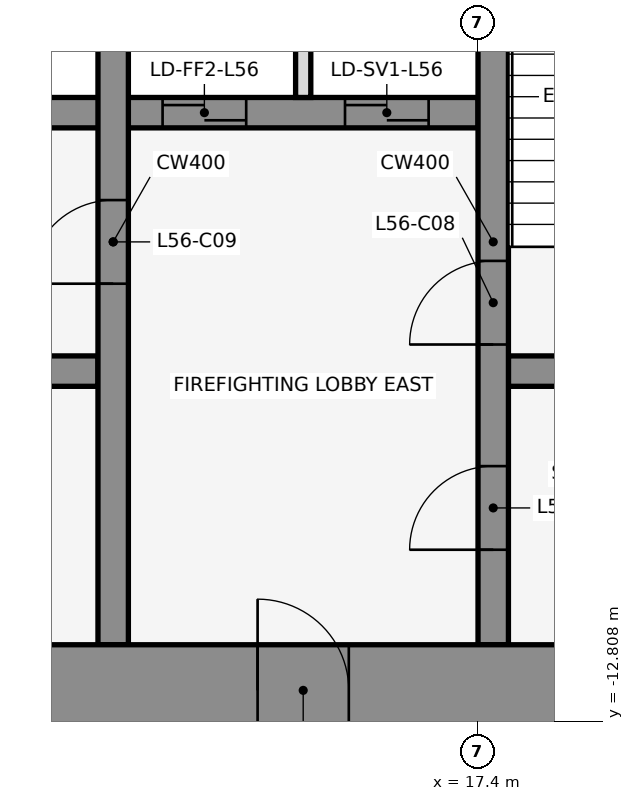
"""IFC4 building model, lengths in metres.
Left out: names, types, materials, properties, quantities, classifications, styles, units other than length and angle.
Written with IfcOpenShell. Run it as: python <this file> out.ifc"""

import sys

from ifc_helpers import new_model, si_unit, direction, frame, frame_2d, origin, place, context, subcontext, project, spatial, rectangle, extrude, element, fill, save


model = new_model("IFC4")
c1 = context("Model", 3, precision=1e-05, world=origin(), true_north=direction((0.0, 1.0)))
c2 = subcontext(c1, "Body", "Model", "MODEL_VIEW")
j1 = project(units=[si_unit("LENGTHUNIT", "METRE"), si_unit("PLANEANGLEUNIT", "RADIAN")], contexts=[c1])
p1 = place(None, origin())
s1 = spatial("IfcSite", under=j1, at=p1, CompositionType="ELEMENT")
p2 = place(p1, origin())
s2 = spatial("IfcBuilding", under=s1, at=p2, CompositionType="ELEMENT")
p3 = place(p2, frame((0.0, 0.0, 249.8)))
s3 = spatial("IfcBuildingStorey", under=s2, at=p3, CompositionType="ELEMENT", Elevation=249.8)
p4 = place(p3, frame((6.4, -8.2, 0.0), z_axis=(0.0, 0.0, 1.0), x_axis=(1.0, 0.0, 0.0)))
e1 = element("IfcWall", 1, at=p4, inside=s3, PredefinedType="SHEAR", context=c2, shape_type="SweptSolid", body=[
    extrude(rectangle(XDim=6.0, YDim=0.4, at=frame_2d((3.0, 0.0))), origin(), (0.0, 0.0, 1.0), 4.2),
])
p5 = place(p4, frame((2.65, 0.0, 0.0)))
e2 = element("IfcOpeningElement", 2, at=p5, cuts=e1, PredefinedType="OPENING", context=c2, shape_type="SweptSolid", body=[
    extrude(rectangle(XDim=0.9, YDim=2.1, at=frame_2d((0.45, 1.05))), frame((0.0, 0.212, 0.0), z_axis=(0.0, -1.0, 0.0), x_axis=(1.0, 0.0, 0.0)), (0.0, 0.0, 1.0), 0.424),
])
p6 = place(p3, frame((17.8, -8.2, 0.0), z_axis=(0.0, 0.0, 1.0), x_axis=(1.0, 0.0, 0.0)))
e3 = element("IfcWall", 3, at=p6, inside=s3, PredefinedType="SHEAR", context=c2, shape_type="SweptSolid", body=[
    extrude(rectangle(XDim=3.0, YDim=0.4, at=frame_2d((1.5, 0.0))), origin(), (0.0, 0.0, 1.0), 4.2),
])
p7 = place(p6, frame((0.85, 0.0, 0.0)))
e4 = element("IfcOpeningElement", 4, at=p7, cuts=e3, PredefinedType="OPENING", context=c2, shape_type="SweptSolid", body=[
    extrude(rectangle(XDim=1.2, YDim=2.1, at=frame_2d((0.6, 1.05))), frame((0.0, 0.212, 0.0), z_axis=(0.0, -1.0, 0.0), x_axis=(1.0, 0.0, 0.0)), (0.0, 0.0, 1.0), 0.424),
])
p8 = place(p3, frame((3.8, -4.8, 0.0), z_axis=(0.0, 0.0, 1.0), x_axis=(1.0, 0.0, 0.0)))
e5 = element("IfcWall", 5, at=p8, inside=s3, PredefinedType="SHEAR", context=c2, shape_type="SweptSolid", body=[
    extrude(rectangle(XDim=13.6, YDim=0.4, at=frame_2d((6.8, 0.0))), origin(), (0.0, 0.0, 1.0), 4.2),
])
p9 = place(p8, frame((0.75, 0.0, 0.0)))
e6 = element("IfcOpeningElement", 6, at=p9, cuts=e5, PredefinedType="OPENING", context=c2, shape_type="SweptSolid", body=[
    extrude(rectangle(XDim=1.2, YDim=2.1, at=frame_2d((0.6, 1.05))), frame((0.0, 0.212, 0.0), z_axis=(0.0, -1.0, 0.0), x_axis=(1.0, 0.0, 0.0)), (0.0, 0.0, 1.0), 0.424),
])
p10 = place(p8, frame((3.65, 0.0, 0.0)))
e7 = element("IfcOpeningElement", 7, at=p10, cuts=e5, PredefinedType="OPENING", context=c2, shape_type="SweptSolid", body=[
    extrude(rectangle(XDim=1.2, YDim=2.1, at=frame_2d((0.6, 1.05))), frame((0.0, 0.212, 0.0), z_axis=(0.0, -1.0, 0.0), x_axis=(1.0, 0.0, 0.0)), (0.0, 0.0, 1.0), 0.424),
])
p11 = place(p8, frame((6.65, 0.0, 0.0)))
e8 = element("IfcOpeningElement", 8, at=p11, cuts=e5, PredefinedType="OPENING", context=c2, shape_type="SweptSolid", body=[
    extrude(rectangle(XDim=1.2, YDim=2.1, at=frame_2d((0.6, 1.05))), frame((0.0, 0.212, 0.0), z_axis=(0.0, -1.0, 0.0), x_axis=(1.0, 0.0, 0.0)), (0.0, 0.0, 1.0), 0.424),
])
p12 = place(p8, frame((9.45, 0.0, 0.0)))
e9 = element("IfcOpeningElement", 9, at=p12, cuts=e5, PredefinedType="OPENING", context=c2, shape_type="SweptSolid", body=[
    extrude(rectangle(XDim=1.1, YDim=2.1, at=frame_2d((0.55, 1.05))), frame((0.0, 0.212, 0.0), z_axis=(0.0, -1.0, 0.0), x_axis=(1.0, 0.0, 0.0)), (0.0, 0.0, 1.0), 0.424),
])
p13 = place(p8, frame((11.85, 0.0, 0.0)))
e10 = element("IfcOpeningElement", 10, at=p13, cuts=e5, PredefinedType="OPENING", context=c2, shape_type="SweptSolid", body=[
    extrude(rectangle(XDim=1.1, YDim=2.1, at=frame_2d((0.55, 1.05))), frame((0.0, 0.212, 0.0), z_axis=(0.0, -1.0, 0.0), x_axis=(1.0, 0.0, 0.0)), (0.0, 0.0, 1.0), 0.424),
])
p14 = place(p3, frame((12.6, -11.8, 0.0), z_axis=(0.0, 0.0, 1.0), x_axis=(0.0, 1.0, 0.0)))
e11 = element("IfcWall", 11, at=p14, inside=s3, PredefinedType="SHEAR", context=c2, shape_type="SweptSolid", body=[
    extrude(rectangle(XDim=10.6, YDim=0.4, at=frame_2d((5.3, 0.0))), origin(), (0.0, 0.0, 1.0), 4.2),
])
p15 = place(p14, frame((4.75, 0.0, 0.0)))
e12 = element("IfcOpeningElement", 12, at=p15, cuts=e11, PredefinedType="OPENING", context=c2, shape_type="SweptSolid", body=[
    extrude(rectangle(XDim=1.1, YDim=2.1, at=frame_2d((0.55, 1.05))), frame((0.0, 0.212, 0.0), z_axis=(0.0, -1.0, 0.0), x_axis=(1.0, 0.0, 0.0)), (0.0, 0.0, 1.0), 0.424),
])
p16 = place(p3, frame((15.1, -4.6, 0.0), z_axis=(0.0, 0.0, 1.0), x_axis=(0.0, 1.0, 0.0)))
e13 = element("IfcWall", 13, at=p16, inside=s3, PredefinedType="PARTITIONING", context=c2, shape_type="SweptSolid", body=[
    extrude(rectangle(XDim=3.4, YDim=0.2, at=frame_2d((1.7, 0.0))), origin(), (0.0, 0.0, 1.0), 3.039),
])
p17 = place(p3, frame((17.6, -11.8, 0.0), z_axis=(0.0, 0.0, 1.0), x_axis=(0.0, 1.0, 0.0)))
e14 = element("IfcWall", 14, at=p17, inside=s3, PredefinedType="SHEAR", context=c2, shape_type="SweptSolid", body=[
    extrude(rectangle(XDim=10.6, YDim=0.4, at=frame_2d((5.3, 0.0))), origin(), (0.0, 0.0, 1.0), 4.2),
])
p18 = place(p17, frame((1.25, 0.0, 0.0)))
e15 = element("IfcOpeningElement", 15, at=p18, cuts=e14, PredefinedType="OPENING", context=c2, shape_type="SweptSolid", body=[
    extrude(rectangle(XDim=1.1, YDim=2.1, at=frame_2d((0.55, 1.05))), frame((0.0, 0.212, 0.0), z_axis=(0.0, -1.0, 0.0), x_axis=(1.0, 0.0, 0.0)), (0.0, 0.0, 1.0), 0.424),
])
p19 = place(p17, frame((3.95, 0.0, 0.0)))
e16 = element("IfcOpeningElement", 16, at=p19, cuts=e14, PredefinedType="OPENING", context=c2, shape_type="SweptSolid", body=[
    extrude(rectangle(XDim=1.1, YDim=2.1, at=frame_2d((0.55, 1.05))), frame((0.0, 0.212, 0.0), z_axis=(0.0, -1.0, 0.0), x_axis=(1.0, 0.0, 0.0)), (0.0, 0.0, 1.0), 0.424),
])
p20 = place(p3, frame((-22.0, -12.4, 0.0), z_axis=(0.0, 0.0, 1.0), x_axis=(1.0, 0.0, 0.0)))
e17 = element("IfcWall", 17, at=p20, inside=s3, PredefinedType="SHEAR", context=c2, shape_type="SweptSolid", body=[
    extrude(rectangle(XDim=44.0, YDim=1.2, at=frame_2d((22.0, 0.0))), origin(), (0.0, 0.0, 1.0), 4.2),
])
p21 = place(p20, frame((2.2, 0.0, 0.0)))
e18 = element("IfcOpeningElement", 18, at=p21, cuts=e17, PredefinedType="OPENING", context=c2, shape_type="SweptSolid", body=[
    extrude(rectangle(XDim=1.2, YDim=2.1, at=frame_2d((0.6, 1.05))), frame((0.0, 0.612, 0.0), z_axis=(0.0, -1.0, 0.0), x_axis=(1.0, 0.0, 0.0)), (0.0, 0.0, 1.0), 1.224),
])
p22 = place(p20, frame((21.4, 0.0, 0.0)))
e19 = element("IfcOpeningElement", 19, at=p22, cuts=e17, PredefinedType="OPENING", context=c2, shape_type="SweptSolid", body=[
    extrude(rectangle(XDim=1.2, YDim=2.1, at=frame_2d((0.6, 1.05))), frame((0.0, 0.612, 0.0), z_axis=(0.0, -1.0, 0.0), x_axis=(1.0, 0.0, 0.0)), (0.0, 0.0, 1.0), 1.224),
])
p23 = place(p20, frame((40.6, 0.0, 0.0)))
e20 = element("IfcOpeningElement", 20, at=p23, cuts=e17, PredefinedType="OPENING", context=c2, shape_type="SweptSolid", body=[
    extrude(rectangle(XDim=1.2, YDim=2.1, at=frame_2d((0.6, 1.05))), frame((0.0, 0.612, 0.0), z_axis=(0.0, -1.0, 0.0), x_axis=(1.0, 0.0, 0.0)), (0.0, 0.0, 1.0), 1.224),
])
p24 = place(p20, frame((16.0, 0.0, 0.0)))
e21 = element("IfcOpeningElement", 21, at=p24, cuts=e17, PredefinedType="OPENING", context=c2, shape_type="SweptSolid", body=[
    extrude(rectangle(XDim=1.8, YDim=2.1, at=frame_2d((0.9, 1.05))), frame((0.0, 0.612, 0.0), z_axis=(0.0, -1.0, 0.0), x_axis=(1.0, 0.0, 0.0)), (0.0, 0.0, 1.0), 1.224),
])
p25 = place(p20, frame((6.3, 0.0, 0.0)))
e22 = element("IfcOpeningElement", 22, at=p25, cuts=e17, PredefinedType="OPENING", context=c2, shape_type="SweptSolid", body=[
    extrude(rectangle(XDim=1.2, YDim=2.1, at=frame_2d((0.6, 1.05))), frame((0.0, 0.612, 0.0), z_axis=(0.0, -1.0, 0.0), x_axis=(1.0, 0.0, 0.0)), (0.0, 0.0, 1.0), 1.224),
])
p26 = place(p20, frame((26.2, 0.0, 0.0)))
e23 = element("IfcOpeningElement", 23, at=p26, cuts=e17, PredefinedType="OPENING", context=c2, shape_type="SweptSolid", body=[
    extrude(rectangle(XDim=1.8, YDim=2.1, at=frame_2d((0.9, 1.05))), frame((0.0, 0.612, 0.0), z_axis=(0.0, -1.0, 0.0), x_axis=(1.0, 0.0, 0.0)), (0.0, 0.0, 1.0), 1.224),
])
p27 = place(p20, frame((36.5, 0.0, 0.0)))
e24 = element("IfcOpeningElement", 24, at=p27, cuts=e17, PredefinedType="OPENING", context=c2, shape_type="SweptSolid", body=[
    extrude(rectangle(XDim=1.2, YDim=2.1, at=frame_2d((0.6, 1.05))), frame((0.0, 0.612, 0.0), z_axis=(0.0, -1.0, 0.0), x_axis=(1.0, 0.0, 0.0)), (0.0, 0.0, 1.0), 1.224),
])
p28 = place(p18, origin())
e25 = element("IfcDoor", 25, at=p28, inside=s3, OperationType="SINGLE_SWING_LEFT", PredefinedType="DOOR", context=c2, shape_type="SweptSolid", body=[
    extrude(rectangle(XDim=1.1, YDim=2.1, at=frame_2d((0.55, 1.05))), frame((0.0, 0.025, 0.0), z_axis=(0.0, -1.0, 0.0), x_axis=(1.0, 0.0, 0.0)), (0.0, 0.0, 1.0), 0.05),
])
fill(e15, e25)
p29 = place(p12, origin())
e26 = element("IfcDoor", 26, at=p29, inside=s3, OperationType="DOUBLE_DOOR_SLIDING", PredefinedType="DOOR", context=c2, shape_type="SweptSolid", body=[
    extrude(rectangle(XDim=1.1, YDim=2.1, at=frame_2d((0.55, 1.05))), frame((0.0, 0.025, 0.0), z_axis=(0.0, -1.0, 0.0), x_axis=(1.0, 0.0, 0.0)), (0.0, 0.0, 1.0), 0.05),
])
fill(e9, e26)
p30 = place(p13, origin())
e27 = element("IfcDoor", 27, at=p30, inside=s3, OperationType="DOUBLE_DOOR_SLIDING", PredefinedType="DOOR", context=c2, shape_type="SweptSolid", body=[
    extrude(rectangle(XDim=1.1, YDim=2.1, at=frame_2d((0.55, 1.05))), frame((0.0, 0.025, 0.0), z_axis=(0.0, -1.0, 0.0), x_axis=(1.0, 0.0, 0.0)), (0.0, 0.0, 1.0), 0.05),
])
fill(e10, e27)
p31 = place(p19, origin())
e28 = element("IfcDoor", 28, at=p31, inside=s3, OperationType="SINGLE_SWING_RIGHT", PredefinedType="DOOR", context=c2, shape_type="SweptSolid", body=[
    extrude(rectangle(XDim=1.1, YDim=2.1, at=frame_2d((0.55, 1.05))), frame((0.0, 0.025, 0.0), z_axis=(0.0, -1.0, 0.0), x_axis=(1.0, 0.0, 0.0)), (0.0, 0.0, 1.0), 0.05),
])
fill(e16, e28)
p32 = place(p15, frame((1.1, 0.0, 0.0), z_axis=(0.0, 0.0, 1.0), x_axis=(-1.0, 0.0, 0.0)))
e29 = element("IfcDoor", 29, at=p32, inside=s3, OperationType="SINGLE_SWING_RIGHT", PredefinedType="DOOR", context=c2, shape_type="SweptSolid", body=[
    extrude(rectangle(XDim=1.1, YDim=2.1, at=frame_2d((0.55, 1.05))), frame((0.0, 0.025, 0.0), z_axis=(0.0, -1.0, 0.0), x_axis=(1.0, 0.0, 0.0)), (0.0, 0.0, 1.0), 0.05),
])
fill(e12, e29)
p33 = place(p27, frame((1.2, 0.0, 0.0), z_axis=(0.0, 0.0, 1.0), x_axis=(-1.0, 0.0, 0.0)))
e30 = element("IfcDoor", 30, at=p33, inside=s3, OperationType="SINGLE_SWING_RIGHT", PredefinedType="DOOR", context=c2, shape_type="SweptSolid", body=[
    extrude(rectangle(XDim=1.2, YDim=2.1, at=frame_2d((0.6, 1.05))), frame((0.0, 0.025, 0.0), z_axis=(0.0, -1.0, 0.0), x_axis=(1.0, 0.0, 0.0)), (0.0, 0.0, 1.0), 0.05),
])
fill(e24, e30)
save(model, sys.argv[1])
